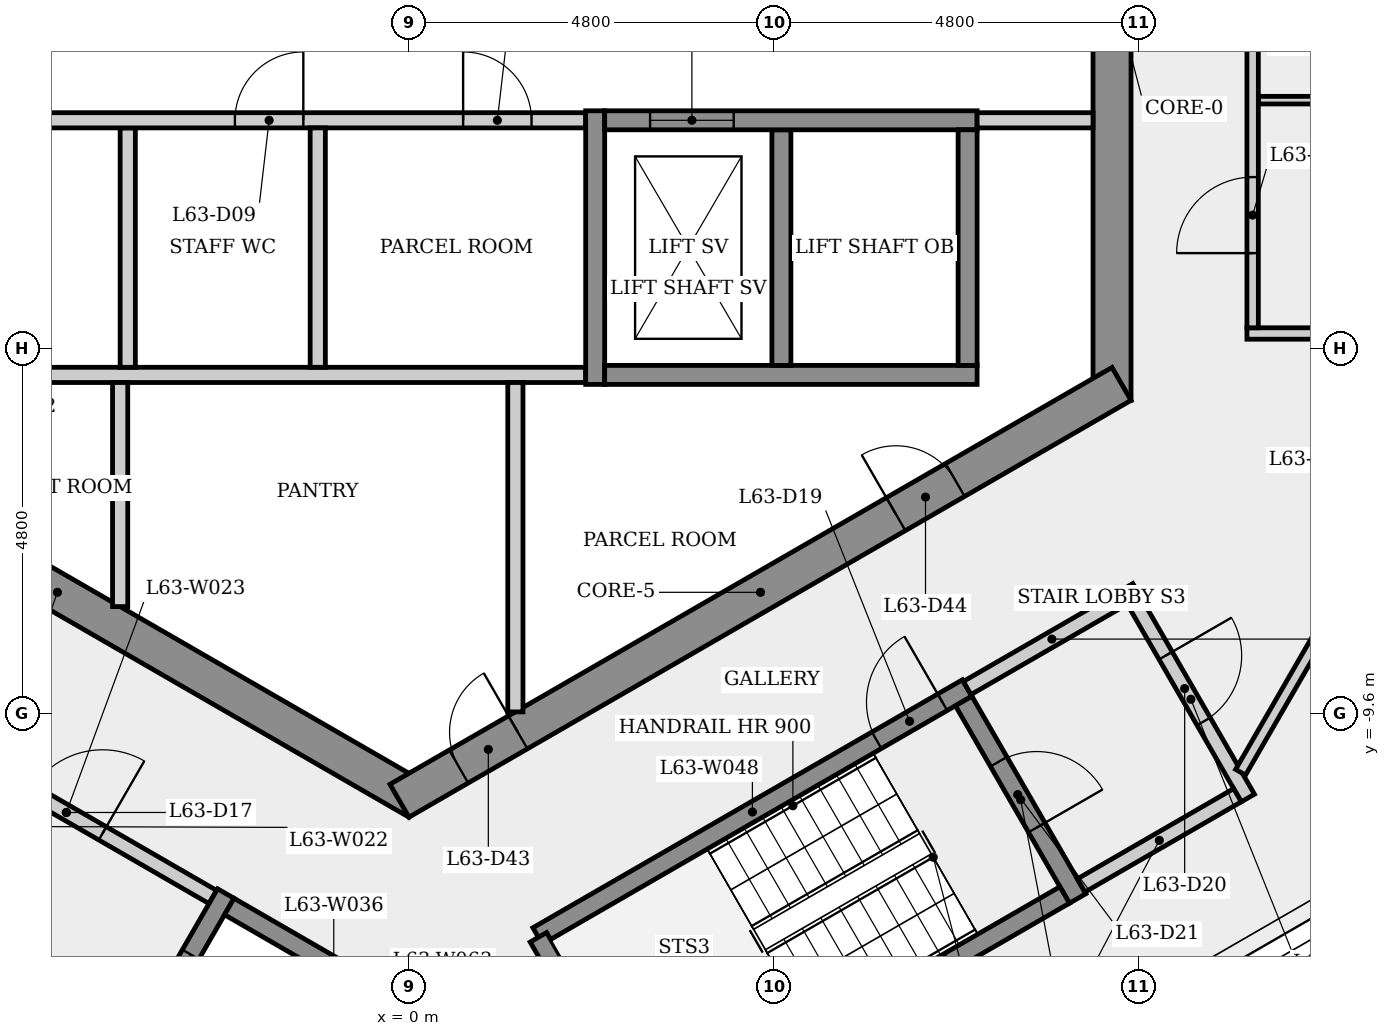
"""IFC4 building model, lengths in metres.
Left out: names, types, materials, properties, quantities, classifications, styles, units other than length and angle.
Written with IfcOpenShell. Run it as: python <this file> out.ifc"""

import sys

from ifc_helpers import new_model, si_unit, direction, frame, frame_2d, origin, place, context, subcontext, project, spatial, rectangle, extrude, element, fill, save


model = new_model("IFC4")
c1 = context("Model", 3, precision=1e-05, world=origin(), true_north=direction((0.0, 1.0)))
c2 = subcontext(c1, "Body", "Model", "MODEL_VIEW")
j1 = project(units=[si_unit("LENGTHUNIT", "METRE"), si_unit("PLANEANGLEUNIT", "RADIAN")], contexts=[c1])
p1 = place(None, origin())
s1 = spatial("IfcSite", under=j1, at=p1, CompositionType="ELEMENT")
p2 = place(p1, origin())
s2 = spatial("IfcBuilding", under=s1, at=p2, CompositionType="ELEMENT")
p3 = place(p2, frame((0.0, 0.0, 235.9)))
s3 = spatial("IfcBuildingStorey", under=s2, at=p3, CompositionType="ELEMENT", Elevation=235.9)
p4 = place(p3, frame((9.25, -5.485, 0.0), z_axis=(0.0, 0.0, 1.0), x_axis=(0.0, 1.0, 0.0)))
e1 = element("IfcWall", 1, at=p4, inside=s3, PredefinedType="SHEAR", context=c2, shape_type="SweptSolid", body=[
    extrude(rectangle(XDim=10.97, YDim=0.5, at=frame_2d((5.485, 0.0))), origin(), (0.0, 0.0, 1.0), 3.4),
])
p5 = place(p4, frame((4.685, 0.0, 0.0)))
e2 = element("IfcOpeningElement", 2, at=p5, cuts=e1, PredefinedType="OPENING", context=c2, shape_type="SweptSolid", body=[
    extrude(rectangle(XDim=1.6, YDim=2.1, at=frame_2d((0.8, 1.05))), frame((0.0, 0.26, 0.0), z_axis=(0.0, -1.0, 0.0), x_axis=(1.0, 0.0, 0.0)), (0.0, 0.0, 1.0), 0.52),
])
p6 = place(p3, frame((-9.375, -5.268, 0.0), z_axis=(0.0, 0.0, 1.0), x_axis=(0.866023993627, -0.500002442456, 0.0)))
e3 = element("IfcWall", 3, at=p6, inside=s3, PredefinedType="SHEAR", context=c2, shape_type="SweptSolid", body=[
    extrude(rectangle(XDim=10.97, YDim=0.5, at=frame_2d((5.485, 0.0))), origin(), (0.0, 0.0, 1.0), 3.4),
])
p7 = place(p6, frame((2.842, 0.0, 0.0)))
e4 = element("IfcOpeningElement", 4, at=p7, cuts=e3, PredefinedType="OPENING", context=c2, shape_type="SweptSolid", body=[
    extrude(rectangle(XDim=0.9, YDim=2.1, at=frame_2d((0.45, 1.05))), frame((0.0, 0.26, 0.0), z_axis=(0.0, -1.0, 0.0), x_axis=(1.0, 0.0, 0.0)), (0.0, 0.0, 1.0), 0.52),
])
p8 = place(p3, frame((-0.125, -10.753, 0.0), z_axis=(0.0, 0.0, 1.0), x_axis=(0.866023993627, 0.500002442456, 0.0)))
e5 = element("IfcWall", 5, at=p8, inside=s3, PredefinedType="SHEAR", context=c2, shape_type="SweptSolid", body=[
    extrude(rectangle(XDim=10.97, YDim=0.5, at=frame_2d((5.485, 0.0))), origin(), (0.0, 0.0, 1.0), 3.4),
])
p9 = place(p8, frame((0.9, 0.0, 0.0)))
e6 = element("IfcOpeningElement", 6, at=p9, cuts=e5, PredefinedType="OPENING", context=c2, shape_type="SweptSolid", body=[
    extrude(rectangle(XDim=0.9, YDim=2.1, at=frame_2d((0.45, 1.05))), frame((0.0, 0.26, 0.0), z_axis=(0.0, -1.0, 0.0), x_axis=(1.0, 0.0, 0.0)), (0.0, 0.0, 1.0), 0.52),
])
p10 = place(p8, frame((7.542, 0.0, 0.0)))
e7 = element("IfcOpeningElement", 7, at=p10, cuts=e5, PredefinedType="OPENING", context=c2, shape_type="SweptSolid", body=[
    extrude(rectangle(XDim=0.9, YDim=2.1, at=frame_2d((0.45, 1.05))), frame((0.0, 0.26, 0.0), z_axis=(0.0, -1.0, 0.0), x_axis=(1.0, 0.0, 0.0)), (0.0, 0.0, 1.0), 0.52),
])
p11 = place(p3, frame((-9.0, -5.15, 0.0), z_axis=(0.0, 0.0, 1.0), x_axis=(1.0, 0.0, 0.0)))
e8 = element("IfcWall", 8, at=p11, inside=s3, PredefinedType="PARTITIONING", context=c2, shape_type="SweptSolid", body=[
    extrude(rectangle(XDim=11.325, YDim=0.2, at=frame_2d((5.663, 0.0))), origin(), (0.0, 0.0, 1.0), 3.05),
])
p12 = place(p3, frame((-6.435, -9.795, 0.0), z_axis=(0.0, 0.0, 1.0), x_axis=(0.866012907634, -0.500021643343, 0.0)))
e9 = element("IfcWall", 9, at=p12, inside=s3, PredefinedType="PARTITIONING", context=c2, shape_type="SweptSolid", body=[
    extrude(rectangle(XDim=4.45, YDim=0.2, at=frame_2d((2.225, 0.0))), origin(), (0.0, 0.0, 1.0), 3.05),
])
p13 = place(p12, frame((1.675, 0.0, 0.0)))
e10 = element("IfcOpeningElement", 10, at=p13, cuts=e9, PredefinedType="OPENING", context=c2, shape_type="SweptSolid", body=[
    extrude(rectangle(XDim=1.1, YDim=2.1, at=frame_2d((0.55, 1.05))), frame((0.0, 0.11, 0.0), z_axis=(0.0, -1.0, 0.0), x_axis=(1.0, 0.0, 0.0)), (0.0, 0.0, 1.0), 0.22),
])
p14 = place(p3, frame((-3.8, -5.25, 0.0), z_axis=(0.0, 0.0, 1.0), x_axis=(0.0, -1.0, 0.0)))
e11 = element("IfcWall", 11, at=p14, inside=s3, PredefinedType="PARTITIONING", context=c2, shape_type="SweptSolid", body=[
    extrude(rectangle(XDim=2.948, YDim=0.2, at=frame_2d((1.474, 0.0))), origin(), (0.0, 0.0, 1.0), 3.05),
])
p15 = place(p3, frame((-3.7, -1.9, 0.0), z_axis=(0.0, 0.0, 1.0), x_axis=(0.0, -1.0, 0.0)))
e12 = element("IfcWall", 12, at=p15, inside=s3, PredefinedType="PARTITIONING", context=c2, shape_type="SweptSolid", body=[
    extrude(rectangle(XDim=3.15, YDim=0.2, at=frame_2d((1.575, 0.0))), origin(), (0.0, 0.0, 1.0), 3.05),
])
p16 = place(p3, frame((-9.0, -1.8, 0.0), z_axis=(0.0, 0.0, 1.0), x_axis=(1.0, 0.0, 0.0)))
e13 = element("IfcWall", 13, at=p16, inside=s3, PredefinedType="PARTITIONING", context=c2, shape_type="SweptSolid", body=[
    extrude(rectangle(XDim=11.325, YDim=0.2, at=frame_2d((5.663, 0.0))), origin(), (0.0, 0.0, 1.0), 3.05),
])
p17 = place(p16, frame((2.185, 0.0, 0.0)))
e14 = element("IfcOpeningElement", 14, at=p17, cuts=e13, PredefinedType="OPENING", context=c2, shape_type="SweptSolid", body=[
    extrude(rectangle(XDim=0.9, YDim=2.1, at=frame_2d((0.45, 1.05))), frame((0.0, 0.11, 0.0), z_axis=(0.0, -1.0, 0.0), x_axis=(1.0, 0.0, 0.0)), (0.0, 0.0, 1.0), 0.22),
])
p18 = place(p16, frame((6.71, 0.0, 0.0)))
e15 = element("IfcOpeningElement", 15, at=p18, cuts=e13, PredefinedType="OPENING", context=c2, shape_type="SweptSolid", body=[
    extrude(rectangle(XDim=0.9, YDim=2.1, at=frame_2d((0.45, 1.05))), frame((0.0, 0.11, 0.0), z_axis=(0.0, -1.0, 0.0), x_axis=(1.0, 0.0, 0.0)), (0.0, 0.0, 1.0), 0.22),
])
p19 = place(p16, frame((9.713, 0.0, 0.0)))
e16 = element("IfcOpeningElement", 16, at=p19, cuts=e13, PredefinedType="OPENING", context=c2, shape_type="SweptSolid", body=[
    extrude(rectangle(XDim=0.9, YDim=2.1, at=frame_2d((0.45, 1.05))), frame((0.0, 0.11, 0.0), z_axis=(0.0, -1.0, 0.0), x_axis=(1.0, 0.0, 0.0)), (0.0, 0.0, 1.0), 0.22),
])
p20 = place(p3, frame((-2.41, -11.974, 0.0), z_axis=(0.0, 0.0, 1.0), x_axis=(-0.49998675294, -0.866033051843, 0.0)))
e17 = element("IfcWall", 17, at=p20, inside=s3, PredefinedType="SHEAR", context=c2, shape_type="SweptSolid", body=[
    extrude(rectangle(XDim=2.825, YDim=0.25, at=frame_2d((1.413, 0.0))), origin(), (0.0, 0.0, 1.0), 3.05),
])
p21 = place(p20, frame((0.926, 0.0, 0.0)))
e18 = element("IfcOpeningElement", 18, at=p21, cuts=e17, PredefinedType="OPENING", context=c2, shape_type="SweptSolid", body=[
    extrude(rectangle(XDim=1.1, YDim=2.1, at=frame_2d((0.55, 1.05))), frame((0.0, 0.135, 0.0), z_axis=(0.0, -1.0, 0.0), x_axis=(1.0, 0.0, 0.0)), (0.0, 0.0, 1.0), 0.27),
])
p22 = place(p3, frame((-2.364, -12.145, 0.0), z_axis=(0.0, 0.0, 1.0), x_axis=(0.866048579423, -0.499959856469, 0.0)))
e19 = element("IfcWall", 19, at=p22, inside=s3, PredefinedType="SHEAR", context=c2, shape_type="SweptSolid", body=[
    extrude(rectangle(XDim=3.175, YDim=0.25, at=frame_2d((1.587, 0.0))), origin(), (0.0, 0.0, 1.0), 3.4),
])
p23 = place(p3, frame((-1.2, -1.9, 0.0), z_axis=(0.0, 0.0, 1.0), x_axis=(0.0, -1.0, 0.0)))
e20 = element("IfcWall", 20, at=p23, inside=s3, PredefinedType="PARTITIONING", context=c2, shape_type="SweptSolid", body=[
    extrude(rectangle(XDim=3.15, YDim=0.2, at=frame_2d((1.575, 0.0))), origin(), (0.0, 0.0, 1.0), 3.05),
])
p24 = place(p3, frame((1.4, -5.25, 0.0), z_axis=(0.0, 0.0, 1.0), x_axis=(0.0, -1.0, 0.0)))
e21 = element("IfcWall", 21, at=p24, inside=s3, PredefinedType="PARTITIONING", context=c2, shape_type="SweptSolid", body=[
    extrude(rectangle(XDim=4.334, YDim=0.2, at=frame_2d((2.167, 0.0))), origin(), (0.0, 0.0, 1.0), 3.05),
])
p25 = place(p3, frame((1.693, -12.532, 0.0), z_axis=(0.0, 0.0, 1.0), x_axis=(0.866031063448, 0.499990197047, 0.0)))
e22 = element("IfcWall", 22, at=p25, inside=s3, PredefinedType="SHEAR", context=c2, shape_type="SweptSolid", body=[
    extrude(rectangle(XDim=6.525, YDim=0.25, at=frame_2d((3.263, 0.0))), origin(), (0.0, 0.0, 1.0), 3.05),
])
p26 = place(p25, frame((5.15, 0.0, 0.0)))
e23 = element("IfcOpeningElement", 23, at=p26, cuts=e22, PredefinedType="OPENING", context=c2, shape_type="SweptSolid", body=[
    extrude(rectangle(XDim=1.0, YDim=2.1, at=frame_2d((0.5, 1.05))), frame((0.0, 0.135, 0.0), z_axis=(0.0, -1.0, 0.0), x_axis=(1.0, 0.0, 0.0)), (0.0, 0.0, 1.0), 0.27),
])
p27 = place(p3, frame((2.45, -5.275, 0.0), z_axis=(0.0, 0.0, 1.0), x_axis=(0.0, 1.0, 0.0)))
e24 = element("IfcWall", 24, at=p27, inside=s3, PredefinedType="SHEAR", context=c2, shape_type="SweptSolid", body=[
    extrude(rectangle(XDim=3.6, YDim=0.25, at=frame_2d((1.8, 0.0))), origin(), (0.0, 0.0, 1.0), 3.05),
])
p28 = place(p3, frame((3.256, -15.239, 0.0), z_axis=(0.0, 0.0, 1.0), x_axis=(-0.500003782172, 0.866023220135, 0.0)))
e25 = element("IfcWall", 25, at=p28, inside=s3, PredefinedType="SHEAR", context=c2, shape_type="SweptSolid", body=[
    extrude(rectangle(XDim=3.105, YDim=0.25, at=frame_2d((1.552, 0.0))), origin(), (0.0, 0.0, 1.0), 3.05),
])
p29 = place(p3, frame((2.575, -5.15, 0.0), z_axis=(0.0, 0.0, 1.0), x_axis=(1.0, 0.0, 0.0)))
e26 = element("IfcWall", 26, at=p29, inside=s3, PredefinedType="SHEAR", context=c2, shape_type="SweptSolid", body=[
    extrude(rectangle(XDim=4.9, YDim=0.25, at=frame_2d((2.45, 0.0))), origin(), (0.0, 0.0, 1.0), 3.05),
])
p30 = place(p3, frame((4.9, -1.925, 0.0), z_axis=(0.0, 0.0, 1.0), x_axis=(0.0, -1.0, 0.0)))
e27 = element("IfcWall", 27, at=p30, inside=s3, PredefinedType="SHEAR", context=c2, shape_type="SweptSolid", body=[
    extrude(rectangle(XDim=3.1, YDim=0.25, at=frame_2d((1.55, 0.0))), origin(), (0.0, 0.0, 1.0), 3.4),
])
p31 = place(p3, frame((2.575, -1.8, 0.0), z_axis=(0.0, 0.0, 1.0), x_axis=(1.0, 0.0, 0.0)))
e28 = element("IfcWall", 28, at=p31, inside=s3, PredefinedType="SHEAR", context=c2, shape_type="SweptSolid", body=[
    extrude(rectangle(XDim=4.9, YDim=0.25, at=frame_2d((2.45, 0.0))), origin(), (0.0, 0.0, 1.0), 3.05),
])
p32 = place(p31, frame((0.597, 0.0, 0.0)))
e29 = element("IfcOpeningElement", 29, at=p32, cuts=e28, PredefinedType="OPENING", context=c2, shape_type="SweptSolid", body=[
    extrude(rectangle(XDim=1.1, YDim=2.1, at=frame_2d((0.55, 1.05))), frame((0.0, 0.135, 0.0), z_axis=(0.0, -1.0, 0.0), x_axis=(1.0, 0.0, 0.0)), (0.0, 0.0, 1.0), 0.27),
])
p33 = place(p3, frame((7.073, -12.891, 0.0), z_axis=(0.0, 0.0, 1.0), x_axis=(-0.866023145199, -0.500003911965, 0.0)))
e30 = element("IfcWall", 30, at=p33, inside=s3, PredefinedType="SHEAR", context=c2, shape_type="SweptSolid", body=[
    extrude(rectangle(XDim=4.355, YDim=0.25, at=frame_2d((2.177, 0.0))), origin(), (0.0, 0.0, 1.0), 3.05),
])
p34 = place(p3, frame((7.298, -9.441, 0.0), z_axis=(0.0, 0.0, 1.0), x_axis=(0.50002537861, -0.866010750942, 0.0)))
e31 = element("IfcWall", 31, at=p34, inside=s3, PredefinedType="SHEAR", context=c2, shape_type="SweptSolid", body=[
    extrude(rectangle(XDim=3.0, YDim=0.25, at=frame_2d((1.5, 0.0))), origin(), (0.0, 0.0, 1.0), 3.05),
])
p35 = place(p34, frame((0.923, 0.0, 0.0)))
e32 = element("IfcOpeningElement", 32, at=p35, cuts=e31, PredefinedType="OPENING", context=c2, shape_type="SweptSolid", body=[
    extrude(rectangle(XDim=1.0, YDim=2.1, at=frame_2d((0.5, 1.05))), frame((0.0, 0.135, 0.0), z_axis=(0.0, -1.0, 0.0), x_axis=(1.0, 0.0, 0.0)), (0.0, 0.0, 1.0), 0.27),
])
p36 = place(p3, frame((7.344, -9.27, 0.0), z_axis=(0.0, 0.0, 1.0), x_axis=(0.866005588531, 0.500034319456, 0.0)))
e33 = element("IfcWall", 33, at=p36, inside=s3, PredefinedType="PARTITIONING", context=c2, shape_type="SweptSolid", body=[
    extrude(rectangle(XDim=2.575, YDim=0.2, at=frame_2d((1.288, 0.0))), origin(), (0.0, 0.0, 1.0), 3.05),
])
p37 = place(p3, frame((7.35, -1.925, 0.0), z_axis=(0.0, 0.0, 1.0), x_axis=(0.0, -1.0, 0.0)))
e34 = element("IfcWall", 34, at=p37, inside=s3, PredefinedType="SHEAR", context=c2, shape_type="SweptSolid", body=[
    extrude(rectangle(XDim=3.1, YDim=0.25, at=frame_2d((1.55, 0.0))), origin(), (0.0, 0.0, 1.0), 3.4),
])
p38 = place(p3, frame((8.627, -11.993, 0.0), z_axis=(0.0, 0.0, 1.0), x_axis=(-0.866059624469, -0.499940723351, 0.0)))
e35 = element("IfcWall", 35, at=p38, inside=s3, PredefinedType="SHEAR", context=c2, shape_type="SweptSolid", body=[
    extrude(rectangle(XDim=1.775, YDim=0.25, at=frame_2d((0.888, 0.0))), origin(), (0.0, 0.0, 1.0), 3.05),
])
p39 = place(p3, frame((9.0, -1.8, 0.0), z_axis=(0.0, 0.0, 1.0), x_axis=(-1.0, 0.0, 0.0)))
e36 = element("IfcWall", 36, at=p39, inside=s3, PredefinedType="PARTITIONING", context=c2, shape_type="SweptSolid", body=[
    extrude(rectangle(XDim=1.525, YDim=0.2, at=frame_2d((0.763, 0.0))), origin(), (0.0, 0.0, 1.0), 3.05),
])
p40 = place(p3, frame((9.537, -8.119, 0.0), z_axis=(0.0, 0.0, 1.0), x_axis=(0.499990139034, -0.866031096941, 0.0)))
e37 = element("IfcWall", 37, at=p40, inside=s3, PredefinedType="PARTITIONING", context=c2, shape_type="SweptSolid", body=[
    extrude(rectangle(XDim=3.0, YDim=0.2, at=frame_2d((1.5, 0.0))), origin(), (0.0, 0.0, 1.0), 3.05),
])
p41 = place(p40, frame((0.837, 0.0, 0.0)))
e38 = element("IfcOpeningElement", 38, at=p41, cuts=e37, PredefinedType="OPENING", context=c2, shape_type="SweptSolid", body=[
    extrude(rectangle(XDim=1.0, YDim=2.1, at=frame_2d((0.5, 1.05))), frame((0.0, 0.11, 0.0), z_axis=(0.0, -1.0, 0.0), x_axis=(1.0, 0.0, 0.0)), (0.0, 0.0, 1.0), 0.22),
])
p42 = place(p3, frame((10.901, -10.681, 0.0), z_axis=(0.0, 0.0, 1.0), x_axis=(-0.866007538022, -0.500030943131, 0.0)))
e39 = element("IfcWall", 39, at=p42, inside=s3, PredefinedType="PARTITIONING", context=c2, shape_type="SweptSolid", body=[
    extrude(rectangle(XDim=2.375, YDim=0.2, at=frame_2d((1.188, 0.0))), origin(), (0.0, 0.0, 1.0), 3.05),
])
p43 = place(p3, frame((11.025, -4.605, 0.0), z_axis=(0.0, 0.0, 1.0), x_axis=(1.0, 0.0, 0.0)))
e40 = element("IfcWall", 40, at=p43, inside=s3, PredefinedType="PARTITIONING", context=c2, shape_type="SweptSolid", body=[
    extrude(rectangle(XDim=3.324, YDim=0.15, at=frame_2d((1.662, 0.0))), origin(), (0.0, 0.0, 1.0), 3.05),
])
p44 = place(p3, frame((11.175, -1.535, 0.0), z_axis=(0.0, 0.0, 1.0), x_axis=(1.0, 0.0, 0.0)))
e41 = element("IfcWall", 41, at=p44, inside=s3, PredefinedType="PARTITIONING", context=c2, shape_type="SweptSolid", body=[
    extrude(rectangle(XDim=5.712, YDim=0.1, at=frame_2d((2.856, 0.0))), origin(), (0.0, 0.0, 1.0), 3.05),
])
p45 = place(p3, frame((11.1, -4.53, 0.0), z_axis=(0.0, 0.0, 1.0), x_axis=(0.0, 1.0, 0.0)))
e42 = element("IfcWall", 42, at=p45, inside=s3, PredefinedType="PARTITIONING", context=c2, shape_type="SweptSolid", body=[
    extrude(rectangle(XDim=9.21, YDim=0.15, at=frame_2d((4.605, 0.0))), origin(), (0.0, 0.0, 1.0), 3.05),
])
p46 = place(p45, frame((0.983, 0.0, 0.0)))
e43 = element("IfcOpeningElement", 43, at=p46, cuts=e42, PredefinedType="OPENING", context=c2, shape_type="SweptSolid", body=[
    extrude(rectangle(XDim=1.0, YDim=2.1, at=frame_2d((0.5, 1.05))), frame((0.0, 0.085, 0.0), z_axis=(0.0, -1.0, 0.0), x_axis=(1.0, 0.0, 0.0)), (0.0, 0.0, 1.0), 0.17),
])
p47 = place(p45, frame((4.03, 0.0, 0.0)))
e44 = element("IfcOpeningElement", 44, at=p47, cuts=e42, PredefinedType="OPENING", context=c2, shape_type="SweptSolid", body=[
    extrude(rectangle(XDim=1.0, YDim=2.1, at=frame_2d((0.5, 1.05))), frame((0.0, 0.085, 0.0), z_axis=(0.0, -1.0, 0.0), x_axis=(1.0, 0.0, 0.0)), (0.0, 0.0, 1.0), 0.17),
])
p48 = place(p45, frame((7.1, 0.0, 0.0)))
e45 = element("IfcOpeningElement", 45, at=p48, cuts=e42, PredefinedType="OPENING", context=c2, shape_type="SweptSolid", body=[
    extrude(rectangle(XDim=1.0, YDim=2.1, at=frame_2d((0.5, 1.05))), frame((0.0, 0.085, 0.0), z_axis=(0.0, -1.0, 0.0), x_axis=(1.0, 0.0, 0.0)), (0.0, 0.0, 1.0), 0.17),
])
p49 = place(p3, frame((14.237, -4.67, 0.0), z_axis=(0.0, 0.0, 1.0), x_axis=(-0.500003557676, -0.866023349749, 0.0)))
e46 = element("IfcWall", 46, at=p49, inside=s3, PredefinedType="PARTITIONING", context=c2, shape_type="SweptSolid", body=[
    extrude(rectangle(XDim=6.591, YDim=0.15, at=frame_2d((3.295, 0.0))), origin(), (0.0, 0.0, 1.0), 3.05),
])
p50 = place(p49, frame((2.795, 0.0, 0.0)))
e47 = element("IfcOpeningElement", 47, at=p50, cuts=e46, PredefinedType="OPENING", context=c2, shape_type="SweptSolid", body=[
    extrude(rectangle(XDim=1.0, YDim=2.1, at=frame_2d((0.5, 1.05))), frame((0.0, 0.085, 0.0), z_axis=(0.0, -1.0, 0.0), x_axis=(1.0, 0.0, 0.0)), (0.0, 0.0, 1.0), 0.17),
])
p51 = place(p32, origin())
e48 = element("IfcDoor", 48, at=p51, inside=s3, OperationType="SLIDING_TO_LEFT", PredefinedType="DOOR", context=c2, shape_type="SweptSolid", body=[
    extrude(rectangle(XDim=1.1, YDim=2.1, at=frame_2d((0.55, 1.05))), frame((0.0, 0.025, 0.0), z_axis=(0.0, -1.0, 0.0), x_axis=(1.0, 0.0, 0.0)), (0.0, 0.0, 1.0), 0.05),
])
fill(e29, e48)
p52 = place(p18, origin())
e49 = element("IfcDoor", 49, at=p52, inside=s3, OperationType="SINGLE_SWING_RIGHT", PredefinedType="DOOR", context=c2, shape_type="SweptSolid", body=[
    extrude(rectangle(XDim=0.9, YDim=2.1, at=frame_2d((0.45, 1.05))), frame((0.0, 0.025, 0.0), z_axis=(0.0, -1.0, 0.0), x_axis=(1.0, 0.0, 0.0)), (0.0, 0.0, 1.0), 0.05),
])
fill(e15, e49)
p53 = place(p19, origin())
e50 = element("IfcDoor", 50, at=p53, inside=s3, OperationType="SINGLE_SWING_LEFT", PredefinedType="DOOR", context=c2, shape_type="SweptSolid", body=[
    extrude(rectangle(XDim=0.9, YDim=2.1, at=frame_2d((0.45, 1.05))), frame((0.0, 0.025, 0.0), z_axis=(0.0, -1.0, 0.0), x_axis=(1.0, 0.0, 0.0)), (0.0, 0.0, 1.0), 0.05),
])
fill(e16, e50)
p54 = place(p13, origin())
e51 = element("IfcDoor", 51, at=p54, inside=s3, OperationType="SINGLE_SWING_RIGHT", PredefinedType="DOOR", context=c2, shape_type="SweptSolid", body=[
    extrude(rectangle(XDim=1.1, YDim=2.1, at=frame_2d((0.55, 1.05))), frame((0.0, 0.025, 0.0), z_axis=(0.0, -1.0, 0.0), x_axis=(1.0, 0.0, 0.0)), (0.0, 0.0, 1.0), 0.05),
])
fill(e10, e51)
p55 = place(p21, origin())
e52 = element("IfcDoor", 52, at=p55, inside=s3, OperationType="SLIDING_TO_LEFT", PredefinedType="DOOR", context=c2, shape_type="SweptSolid", body=[
    extrude(rectangle(XDim=1.1, YDim=2.1, at=frame_2d((0.55, 1.05))), frame((0.0, 0.025, 0.0), z_axis=(0.0, -1.0, 0.0), x_axis=(1.0, 0.0, 0.0)), (0.0, 0.0, 1.0), 0.05),
])
fill(e18, e52)
p56 = place(p26, origin())
e53 = element("IfcDoor", 53, at=p56, inside=s3, OperationType="SINGLE_SWING_RIGHT", PredefinedType="DOOR", context=c2, shape_type="SweptSolid", body=[
    extrude(rectangle(XDim=1.0, YDim=2.1, at=frame_2d((0.5, 1.05))), frame((0.0, 0.025, 0.0), z_axis=(0.0, -1.0, 0.0), x_axis=(1.0, 0.0, 0.0)), (0.0, 0.0, 1.0), 0.05),
])
fill(e23, e53)
p57 = place(p41, origin())
e54 = element("IfcDoor", 54, at=p57, inside=s3, OperationType="SINGLE_SWING_LEFT", PredefinedType="DOOR", context=c2, shape_type="SweptSolid", body=[
    extrude(rectangle(XDim=1.0, YDim=2.1, at=frame_2d((0.5, 1.05))), frame((0.0, 0.025, 0.0), z_axis=(0.0, -1.0, 0.0), x_axis=(1.0, 0.0, 0.0)), (0.0, 0.0, 1.0), 0.05),
])
fill(e38, e54)
p58 = place(p35, origin())
e55 = element("IfcDoor", 55, at=p58, inside=s3, OperationType="SINGLE_SWING_RIGHT", PredefinedType="DOOR", context=c2, shape_type="SweptSolid", body=[
    extrude(rectangle(XDim=1.0, YDim=2.1, at=frame_2d((0.5, 1.05))), frame((0.0, 0.025, 0.0), z_axis=(0.0, -1.0, 0.0), x_axis=(1.0, 0.0, 0.0)), (0.0, 0.0, 1.0), 0.05),
])
fill(e32, e55)
p59 = place(p46, origin())
e56 = element("IfcDoor", 56, at=p59, inside=s3, OperationType="SINGLE_SWING_LEFT", PredefinedType="DOOR", context=c2, shape_type="SweptSolid", body=[
    extrude(rectangle(XDim=1.0, YDim=2.1, at=frame_2d((0.5, 1.05))), frame((0.0, 0.025, 0.0), z_axis=(0.0, -1.0, 0.0), x_axis=(1.0, 0.0, 0.0)), (0.0, 0.0, 1.0), 0.05),
])
fill(e43, e56)
p60 = place(p9, origin())
e57 = element("IfcDoor", 57, at=p60, inside=s3, OperationType="SINGLE_SWING_RIGHT", PredefinedType="DOOR", context=c2, shape_type="SweptSolid", body=[
    extrude(rectangle(XDim=0.9, YDim=2.1, at=frame_2d((0.45, 1.05))), frame((0.0, 0.025, 0.0), z_axis=(0.0, -1.0, 0.0), x_axis=(1.0, 0.0, 0.0)), (0.0, 0.0, 1.0), 0.05),
])
fill(e6, e57)
p61 = place(p10, origin())
e58 = element("IfcDoor", 58, at=p61, inside=s3, OperationType="SINGLE_SWING_LEFT", PredefinedType="DOOR", context=c2, shape_type="SweptSolid", body=[
    extrude(rectangle(XDim=0.9, YDim=2.1, at=frame_2d((0.45, 1.05))), frame((0.0, 0.025, 0.0), z_axis=(0.0, -1.0, 0.0), x_axis=(1.0, 0.0, 0.0)), (0.0, 0.0, 1.0), 0.05),
])
fill(e7, e58)
save(model, sys.argv[1])
